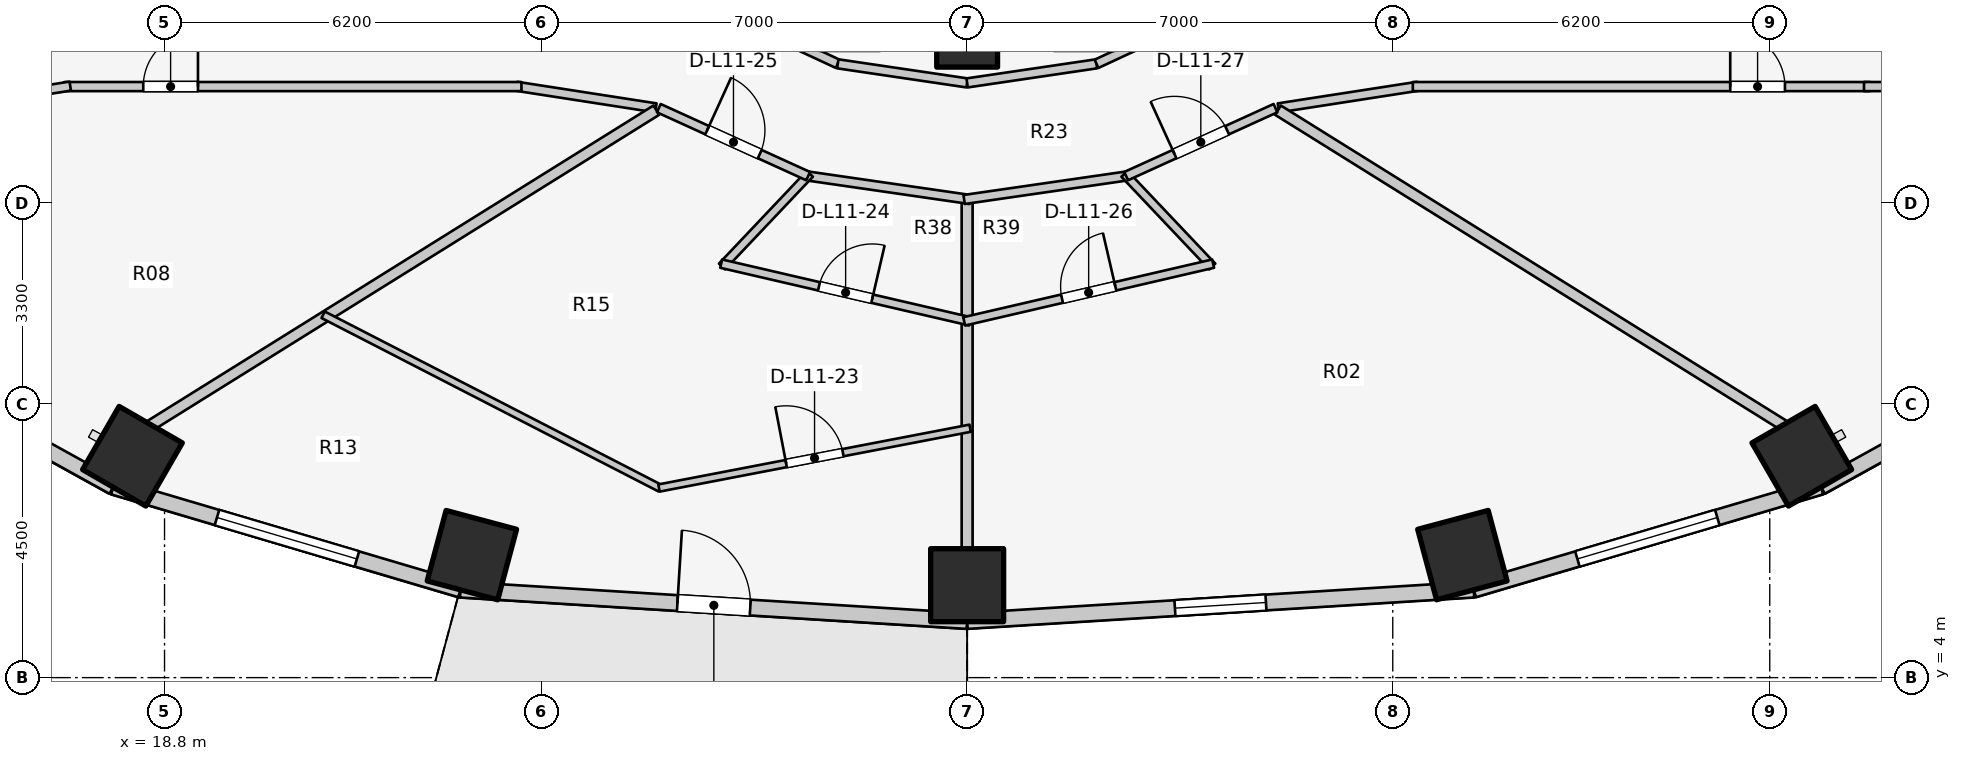
"""IFC4 building model, lengths in metres.
Left out: names, types, materials, properties, quantities, classifications, styles, units other than length and angle.
Written with IfcOpenShell. Run it as: python <this file> out.ifc"""

import sys

from ifc_helpers import new_model, si_unit, direction, frame, frame_2d, origin, origin_2d, place, context, subcontext, project, spatial, rectangle, extrude, element, fill, save


model = new_model("IFC4")
c1 = context("Model", 3, precision=1e-05, world=origin(), true_north=direction((0.0, 1.0)))
c2 = subcontext(c1, "Body", "Model", "MODEL_VIEW")
j1 = project(units=[si_unit("LENGTHUNIT", "METRE"), si_unit("PLANEANGLEUNIT", "RADIAN")], contexts=[c1])
p1 = place(None, origin())
s1 = spatial("IfcSite", under=j1, at=p1, CompositionType="ELEMENT")
p2 = place(p1, origin())
s2 = spatial("IfcBuilding", under=s1, at=p2, CompositionType="ELEMENT")
p3 = place(p2, frame((0.0, 0.0, 40.0)))
s3 = spatial("IfcBuildingStorey", under=s2, at=p3, CompositionType="ELEMENT", Elevation=40.0)
for number, where, z_axis, x_axis in (
    (1, (18.273, 7.641, 0.0), (0.0, 0.0, 1.0), (-0.5, -0.866, 0.0)),
    (2, (23.855, 6.014, 0.0), (0.0, 0.0, 1.0), (-0.259, -0.966, 0.0)),
):
    element("IfcColumn", number, at=place(p3, frame(where, z_axis=z_axis, x_axis=x_axis)), inside=s3, PredefinedType="COLUMN", context=c2, shape_type="SweptSolid", body=[
        extrude(rectangle(XDim=1.2, YDim=1.2, at=origin_2d()), origin(), (0.0, 0.0, 1.0), 3.1),
    ])
p4 = place(p3, frame((32.0, 14.54, 0.0), z_axis=(0.0, 0.0, 1.0), x_axis=(1.0, 0.0, 0.0)))
e3 = element("IfcColumn", 3, at=p4, inside=s3, PredefinedType="COLUMN", context=c2, shape_type="SweptSolid", body=[
    extrude(rectangle(XDim=1.0, YDim=1.0, at=origin_2d()), origin(), (0.0, 0.0, 1.0), 3.1),
])
for number, where, z_axis, x_axis in (
    (4, (32.0, 5.52, 0.0), (0.0, 0.0, 1.0), (0.0, -1.0, 0.0)),
    (5, (40.145, 6.014, 0.0), (0.0, 0.0, 1.0), (0.259, -0.966, 0.0)),
    (6, (45.727, 7.641, 0.0), (0.0, 0.0, 1.0), (0.5, -0.866, 0.0)),
):
    element("IfcColumn", number, at=place(p3, frame(where, z_axis=z_axis, x_axis=x_axis)), inside=s3, PredefinedType="COLUMN", context=c2, shape_type="SweptSolid", body=[
        extrude(rectangle(XDim=1.2, YDim=1.2, at=origin_2d()), origin(), (0.0, 0.0, 1.0), 3.1),
    ])
p5 = place(p3, frame((13.595, 9.55, 0.0), z_axis=(0.0, 0.0, 1.0), x_axis=(0.875137303239, -0.483874674352, 0.0)))
e7 = element("IfcWall", 7, at=p5, inside=s3, PredefinedType="STANDARD", context=c2, shape_type="SweptSolid", body=[
    extrude(rectangle(XDim=4.985, YDim=0.26, at=frame_2d((2.493, 0.0))), origin(), (0.0, 0.0, 1.0), 2.85),
])
p6 = place(p3, frame((17.958, 7.138, 0.0), z_axis=(0.0, 0.0, 1.0), x_axis=(0.958843593522, -0.283934786811, 0.0)))
e8 = element("IfcWall", 8, at=p6, inside=s3, PredefinedType="STANDARD", context=c2, shape_type="SweptSolid", body=[
    extrude(rectangle(XDim=5.955, YDim=0.26, at=frame_2d((2.978, 0.0))), origin(), (0.0, 0.0, 1.0), 2.85),
])
p7 = place(p6, frame((1.778, 0.0, 0.75)))
e9 = element("IfcOpeningElement", 9, at=p7, cuts=e8, PredefinedType="OPENING", context=c2, shape_type="SweptSolid", body=[
    extrude(rectangle(XDim=2.4, YDim=1.7, at=frame_2d((1.2, 0.85))), frame((0.0, 0.14, 0.0), z_axis=(0.0, -1.0, 0.0), x_axis=(1.0, 0.0, 0.0)), (0.0, 0.0, 1.0), 0.28),
])
p8 = place(p3, frame((23.668, 5.447, 0.0), z_axis=(0.0, 0.0, 1.0), x_axis=(0.998090514779, -0.061768311519, 0.0)))
e10 = element("IfcWall", 10, at=p8, inside=s3, PredefinedType="STANDARD", context=c2, shape_type="SweptSolid", body=[
    extrude(rectangle(XDim=8.348, YDim=0.26, at=frame_2d((4.174, 0.0))), origin(), (0.0, 0.0, 1.0), 2.88),
])
p9 = place(p8, frame((3.574, 0.0, 0.0)))
e11 = element("IfcOpeningElement", 11, at=p9, cuts=e10, PredefinedType="OPENING", context=c2, shape_type="SweptSolid", body=[
    extrude(rectangle(XDim=1.2, YDim=2.2, at=frame_2d((0.6, 1.1))), frame((0.0, 0.14, 0.0), z_axis=(0.0, -1.0, 0.0), x_axis=(1.0, 0.0, 0.0)), (0.0, 0.0, 1.0), 0.28),
])
p10 = place(p3, frame((32.0, 4.931, 0.0), z_axis=(0.0, 0.0, 1.0), x_axis=(0.998090514779, 0.061768311519, 0.0)))
e12 = element("IfcWall", 12, at=p10, inside=s3, PredefinedType="STANDARD", context=c2, shape_type="SweptSolid", body=[
    extrude(rectangle(XDim=8.348, YDim=0.26, at=frame_2d((4.174, 0.0))), origin(), (0.0, 0.0, 1.0), 2.85),
])
p11 = place(p10, frame((3.424, 0.0, 0.75)))
e13 = element("IfcOpeningElement", 13, at=p11, cuts=e12, PredefinedType="OPENING", context=c2, shape_type="SweptSolid", body=[
    extrude(rectangle(XDim=1.5, YDim=1.6, at=frame_2d((0.75, 0.8))), frame((0.0, 0.14, 0.0), z_axis=(0.0, -1.0, 0.0), x_axis=(1.0, 0.0, 0.0)), (0.0, 0.0, 1.0), 0.28),
])
p12 = place(p3, frame((40.332, 5.447, 0.0), z_axis=(0.0, 0.0, 1.0), x_axis=(0.958843593522, 0.283934786811, 0.0)))
e14 = element("IfcWall", 14, at=p12, inside=s3, PredefinedType="STANDARD", context=c2, shape_type="SweptSolid", body=[
    extrude(rectangle(XDim=5.955, YDim=0.26, at=frame_2d((2.978, 0.0))), origin(), (0.0, 0.0, 1.0), 2.85),
])
p13 = place(p12, frame((1.778, 0.0, 0.75)))
e15 = element("IfcOpeningElement", 15, at=p13, cuts=e14, PredefinedType="OPENING", context=c2, shape_type="SweptSolid", body=[
    extrude(rectangle(XDim=2.4, YDim=1.7, at=frame_2d((1.2, 0.85))), frame((0.0, 0.14, 0.0), z_axis=(0.0, -1.0, 0.0), x_axis=(1.0, 0.0, 0.0)), (0.0, 0.0, 1.0), 0.28),
])
p14 = place(p3, frame((46.042, 7.138, 0.0), z_axis=(0.0, 0.0, 1.0), x_axis=(0.875137303239, 0.483874674352, 0.0)))
e16 = element("IfcWall", 16, at=p14, inside=s3, PredefinedType="STANDARD", context=c2, shape_type="SweptSolid", body=[
    extrude(rectangle(XDim=4.985, YDim=0.26, at=frame_2d((2.493, 0.0))), origin(), (0.0, 0.0, 1.0), 2.85),
])
p15 = place(p3, frame((27.89, 15.015, 0.0), z_axis=(0.0, 0.0, 1.0), x_axis=(0.906943449489, -0.421252393975, 0.0)))
e17 = element("IfcWall", 17, at=p15, inside=s3, PredefinedType="PARTITIONING", context=c2, shape_type="SweptSolid", body=[
    extrude(rectangle(XDim=2.186, YDim=0.15, at=frame_2d((1.093, 0.0))), origin(), (0.0, 0.0, 1.0), 2.237),
])
for number, where, z_axis, x_axis in (
    (18, (29.873, 14.094, 0.0), (0.0, 0.0, 1.0), (0.989, -0.146, 0.0)),
    (19, (32.0, 13.78, 0.0), (0.0, 0.0, 1.0), (0.989, 0.146, 0.0)),
):
    element("IfcWall", number, at=place(p3, frame(where, z_axis=z_axis, x_axis=x_axis)), inside=s3, PredefinedType="PARTITIONING", context=c2, shape_type="SweptSolid", body=[
        extrude(rectangle(XDim=2.151, YDim=0.15, at=frame_2d((1.075, 0.0))), origin(), (0.0, 0.0, 1.0), 2.237),
    ])
p16 = place(p3, frame((34.127, 14.094, 0.0), z_axis=(0.0, 0.0, 1.0), x_axis=(0.906943449489, 0.421252393975, 0.0)))
e20 = element("IfcWall", 20, at=p16, inside=s3, PredefinedType="PARTITIONING", context=c2, shape_type="SweptSolid", body=[
    extrude(rectangle(XDim=2.186, YDim=0.15, at=frame_2d((1.093, 0.0))), origin(), (0.0, 0.0, 1.0), 2.237),
])
p17 = place(p3, frame((26.881, 13.369, 0.0), z_axis=(0.0, 0.0, 1.0), x_axis=(-0.988184633586, 0.153268163508, 0.0)))
e21 = element("IfcWall", 21, at=p17, inside=s3, PredefinedType="PARTITIONING", context=c2, shape_type="SweptSolid", body=[
    extrude(rectangle(XDim=2.318, YDim=0.15, at=frame_2d((1.159, 0.0))), origin(), (0.0, 0.0, 1.0), 2.237),
])
p18 = place(p3, frame((17.15, 13.72, 0.0), z_axis=(0.0, 0.0, 1.0), x_axis=(1.0, 0.0, 0.0)))
e22 = element("IfcWall", 22, at=p18, inside=s3, PredefinedType="PARTITIONING", context=c2, shape_type="SweptSolid", body=[
    extrude(rectangle(XDim=7.52, YDim=0.15, at=frame_2d((3.76, 0.0))), origin(), (0.0, 0.0, 1.0), 2.237),
])
p19 = place(p18, frame((1.3, 0.0, 0.0)))
e23 = element("IfcOpeningElement", 23, at=p19, cuts=e22, PredefinedType="OPENING", context=c2, shape_type="SweptSolid", body=[
    extrude(rectangle(XDim=0.9, YDim=2.1, at=frame_2d((0.45, 1.05))), frame((0.0, 0.085, 0.0), z_axis=(0.0, -1.0, 0.0), x_axis=(1.0, 0.0, 0.0)), (0.0, 0.0, 1.0), 0.17),
])
p20 = place(p3, frame((17.25, 13.728, 0.0), z_axis=(0.0, 0.0, 1.0), x_axis=(-0.987655781226, -0.156639898525, 0.0)))
e24 = element("IfcWall", 24, at=p20, inside=s3, PredefinedType="PARTITIONING", context=c2, shape_type="SweptSolid", body=[
    extrude(rectangle(XDim=7.552, YDim=0.15, at=frame_2d((3.776, 0.0))), origin(), (0.0, 0.0, 1.0), 2.069),
])
p21 = place(p3, frame((37.119, 13.369, 0.0), z_axis=(0.0, 0.0, 1.0), x_axis=(0.988184633586, 0.153268163508, 0.0)))
e25 = element("IfcWall", 25, at=p21, inside=s3, PredefinedType="PARTITIONING", context=c2, shape_type="SweptSolid", body=[
    extrude(rectangle(XDim=2.318, YDim=0.15, at=frame_2d((1.159, 0.0))), origin(), (0.0, 0.0, 1.0), 2.237),
])
p22 = place(p3, frame((39.33, 13.72, 0.0), z_axis=(0.0, 0.0, 1.0), x_axis=(1.0, 0.0, 0.0)))
e26 = element("IfcWall", 26, at=p22, inside=s3, PredefinedType="PARTITIONING", context=c2, shape_type="SweptSolid", body=[
    extrude(rectangle(XDim=7.52, YDim=0.15, at=frame_2d((3.76, 0.0))), origin(), (0.0, 0.0, 1.0), 2.237),
])
p23 = place(p22, frame((5.22, 0.0, 0.0)))
e27 = element("IfcOpeningElement", 27, at=p23, cuts=e26, PredefinedType="OPENING", context=c2, shape_type="SweptSolid", body=[
    extrude(rectangle(XDim=0.9, YDim=2.1, at=frame_2d((0.45, 1.05))), frame((0.0, 0.085, 0.0), z_axis=(0.0, -1.0, 0.0), x_axis=(1.0, 0.0, 0.0)), (0.0, 0.0, 1.0), 0.17),
])
p24 = place(p3, frame((46.75, 13.72, 0.0), z_axis=(0.0, 0.0, 1.0), x_axis=(1.0, 0.0, 0.0)))
e28 = element("IfcWall", 28, at=p24, inside=s3, PredefinedType="PARTITIONING", context=c2, shape_type="SweptSolid", body=[
    extrude(rectangle(XDim=5.05, YDim=0.15, at=frame_2d((2.525, 0.0))), origin(), (0.0, 0.0, 1.0), 2.069),
])
p25 = place(p3, frame((26.888, 13.332, 0.0), z_axis=(0.0, 0.0, 1.0), x_axis=(-0.848647785721, -0.52895834977, 0.0)))
e29 = element("IfcWall", 29, at=p25, inside=s3, PredefinedType="PARTITIONING", context=c2, shape_type="SweptSolid", body=[
    extrude(rectangle(XDim=9.81, YDim=0.18, at=frame_2d((4.905, 0.0))), origin(), (0.0, 0.0, 1.0), 2.237),
])
p26 = place(p3, frame((32.0, 11.815, 0.0), z_axis=(0.0, 0.0, 1.0), x_axis=(0.0, -1.0, 0.0)))
e30 = element("IfcWall", 30, at=p26, inside=s3, PredefinedType="PARTITIONING", context=c2, shape_type="SweptSolid", body=[
    extrude(rectangle(XDim=5.715, YDim=0.18, at=frame_2d((2.857, 0.0))), origin(), (0.0, 0.0, 1.0), 2.237),
])
p27 = place(p3, frame((37.112, 13.332, 0.0), z_axis=(0.0, 0.0, 1.0), x_axis=(0.848647785721, -0.52895834977, 0.0)))
e31 = element("IfcWall", 31, at=p27, inside=s3, PredefinedType="PARTITIONING", context=c2, shape_type="SweptSolid", body=[
    extrude(rectangle(XDim=9.81, YDim=0.18, at=frame_2d((4.905, 0.0))), origin(), (0.0, 0.0, 1.0), 2.237),
])
p28 = place(p3, frame((21.409, 9.967, 0.0), z_axis=(0.0, 0.0, 1.0), x_axis=(0.889172609005, -0.457571930296, 0.0)))
e32 = element("IfcWall", 32, at=p28, inside=s3, PredefinedType="MOVABLE", context=c2, shape_type="SweptSolid", body=[
    extrude(rectangle(XDim=6.232, YDim=0.12, at=frame_2d((3.116, 0.0))), origin(), (0.0, 0.0, 1.0), 2.237),
])
p29 = place(p3, frame((26.932, 7.118, 0.0), z_axis=(0.0, 0.0, 1.0), x_axis=(0.982039182538, 0.188677089126, 0.0)))
e33 = element("IfcWall", 33, at=p29, inside=s3, PredefinedType="MOVABLE", context=c2, shape_type="SweptSolid", body=[
    extrude(rectangle(XDim=5.211, YDim=0.12, at=frame_2d((2.605, 0.0))), origin(), (0.0, 0.0, 1.0), 2.237),
])
p30 = place(p29, frame((2.131, 0.0, 0.0)))
e34 = element("IfcOpeningElement", 34, at=p30, cuts=e33, PredefinedType="OPENING", context=c2, shape_type="SweptSolid", body=[
    extrude(rectangle(XDim=0.95, YDim=2.1, at=frame_2d((0.475, 1.05))), frame((0.0, 0.07, 0.0), z_axis=(0.0, -1.0, 0.0), x_axis=(1.0, 0.0, 0.0)), (0.0, 0.0, 1.0), 0.14),
])
p31 = place(p3, frame((29.329, 12.256, 0.0), z_axis=(0.0, 0.0, 1.0), x_axis=(0.989701115085, -0.143149232617, 0.0)))
e35 = element("IfcWall", 35, at=p31, inside=s3, PredefinedType="PARTITIONING", context=c2, shape_type="SweptSolid", body=[
    extrude(rectangle(XDim=2.749, YDim=0.15, at=frame_2d((1.375, 0.0))), origin(), (0.0, 0.0, 1.0), 2.237),
])
p32 = place(p3, frame((29.413, 12.285, 0.0), z_axis=(0.0, 0.0, 1.0), x_axis=(-0.687544693502, -0.72614206216, 0.0)))
e36 = element("IfcWall", 36, at=p32, inside=s3, PredefinedType="PLUMBINGWALL", context=c2, shape_type="SweptSolid", body=[
    extrude(rectangle(XDim=2.1, YDim=0.14, at=frame_2d((1.05, 0.0))), origin(), (0.0, 0.0, 1.0), 2.855),
])
p33 = place(p3, frame((27.954, 10.808, 0.0), z_axis=(0.0, 0.0, 1.0), x_axis=(0.974148813221, -0.225907259071, 0.0)))
e37 = element("IfcWall", 37, at=p33, inside=s3, PredefinedType="PLUMBINGWALL", context=c2, shape_type="SweptSolid", body=[
    extrude(rectangle(XDim=4.203, YDim=0.14, at=frame_2d((2.102, 0.0))), origin(), (0.0, 0.0, 1.0), 2.237),
])
p34 = place(p33, frame((1.652, 0.0, 0.0)))
e38 = element("IfcOpeningElement", 38, at=p34, cuts=e37, PredefinedType="OPENING", context=c2, shape_type="SweptSolid", body=[
    extrude(rectangle(XDim=0.9, YDim=2.1, at=frame_2d((0.45, 1.05))), frame((0.0, 0.08, 0.0), z_axis=(0.0, -1.0, 0.0), x_axis=(1.0, 0.0, 0.0)), (0.0, 0.0, 1.0), 0.16),
])
p35 = place(p3, frame((26.929, 13.365, 0.0), z_axis=(0.0, 0.0, 1.0), x_axis=(0.910186679378, -0.414198272186, 0.0)))
e39 = element("IfcWall", 39, at=p35, inside=s3, PredefinedType="PARTITIONING", context=c2, shape_type="SweptSolid", body=[
    extrude(rectangle(XDim=2.698, YDim=0.15, at=frame_2d((1.349, 0.0))), origin(), (0.0, 0.0, 1.0), 2.237),
])
p36 = place(p35, frame((0.874, 0.0, 0.0)))
e40 = element("IfcOpeningElement", 40, at=p36, cuts=e39, PredefinedType="OPENING", context=c2, shape_type="SweptSolid", body=[
    extrude(rectangle(XDim=0.95, YDim=2.1, at=frame_2d((0.475, 1.05))), frame((0.0, 0.085, 0.0), z_axis=(0.0, -1.0, 0.0), x_axis=(1.0, 0.0, 0.0)), (0.0, 0.0, 1.0), 0.17),
])
p37 = place(p3, frame((31.95, 11.863, 0.0), z_axis=(0.0, 0.0, 1.0), x_axis=(0.989701115085, 0.143149232617, 0.0)))
e41 = element("IfcWall", 41, at=p37, inside=s3, PredefinedType="PARTITIONING", context=c2, shape_type="SweptSolid", body=[
    extrude(rectangle(XDim=2.749, YDim=0.15, at=frame_2d((1.375, 0.0))), origin(), (0.0, 0.0, 1.0), 2.237),
])
p38 = place(p3, frame((34.587, 12.285, 0.0), z_axis=(0.0, 0.0, 1.0), x_axis=(0.687544693502, -0.72614206216, 0.0)))
e42 = element("IfcWall", 42, at=p38, inside=s3, PredefinedType="PLUMBINGWALL", context=c2, shape_type="SweptSolid", body=[
    extrude(rectangle(XDim=2.1, YDim=0.14, at=frame_2d((1.05, 0.0))), origin(), (0.0, 0.0, 1.0), 2.855),
])
p39 = place(p3, frame((31.951, 9.859, 0.0), z_axis=(0.0, 0.0, 1.0), x_axis=(0.974148813221, 0.225907259071, 0.0)))
e43 = element("IfcWall", 43, at=p39, inside=s3, PredefinedType="PLUMBINGWALL", context=c2, shape_type="SweptSolid", body=[
    extrude(rectangle(XDim=4.203, YDim=0.14, at=frame_2d((2.102, 0.0))), origin(), (0.0, 0.0, 1.0), 2.237),
])
p40 = place(p39, frame((1.652, 0.0, 0.0)))
e44 = element("IfcOpeningElement", 44, at=p40, cuts=e43, PredefinedType="OPENING", context=c2, shape_type="SweptSolid", body=[
    extrude(rectangle(XDim=0.9, YDim=2.1, at=frame_2d((0.45, 1.05))), frame((0.0, 0.08, 0.0), z_axis=(0.0, -1.0, 0.0), x_axis=(1.0, 0.0, 0.0)), (0.0, 0.0, 1.0), 0.16),
])
p41 = place(p3, frame((34.615, 12.247, 0.0), z_axis=(0.0, 0.0, 1.0), x_axis=(0.910186679378, 0.414198272186, 0.0)))
e45 = element("IfcWall", 45, at=p41, inside=s3, PredefinedType="PARTITIONING", context=c2, shape_type="SweptSolid", body=[
    extrude(rectangle(XDim=2.698, YDim=0.15, at=frame_2d((1.349, 0.0))), origin(), (0.0, 0.0, 1.0), 2.237),
])
p42 = place(p41, frame((0.874, 0.0, 0.0)))
e46 = element("IfcOpeningElement", 46, at=p42, cuts=e45, PredefinedType="OPENING", context=c2, shape_type="SweptSolid", body=[
    extrude(rectangle(XDim=0.95, YDim=2.1, at=frame_2d((0.475, 1.05))), frame((0.0, 0.085, 0.0), z_axis=(0.0, -1.0, 0.0), x_axis=(1.0, 0.0, 0.0)), (0.0, 0.0, 1.0), 0.17),
])
p43 = place(p7, origin())
e47 = element("IfcWindow", 47, at=p43, inside=s3, PartitioningType="SINGLE_PANEL", PredefinedType="WINDOW", context=c2, shape_type="SweptSolid", body=[
    extrude(rectangle(XDim=2.4, YDim=1.7, at=frame_2d((1.2, 0.85))), frame((0.0, 0.03, 0.0), z_axis=(0.0, -1.0, 0.0), x_axis=(1.0, 0.0, 0.0)), (0.0, 0.0, 1.0), 0.06),
])
fill(e9, e47)
p44 = place(p9, origin())
e48 = element("IfcDoor", 48, at=p44, inside=s3, OperationType="SINGLE_SWING_LEFT", PredefinedType="DOOR", context=c2, shape_type="SweptSolid", body=[
    extrude(rectangle(XDim=1.2, YDim=2.2, at=frame_2d((0.6, 1.1))), frame((0.0, 0.025, 0.0), z_axis=(0.0, -1.0, 0.0), x_axis=(1.0, 0.0, 0.0)), (0.0, 0.0, 1.0), 0.05),
])
fill(e11, e48)
p45 = place(p11, origin())
e49 = element("IfcWindow", 49, at=p45, inside=s3, PartitioningType="SINGLE_PANEL", PredefinedType="WINDOW", context=c2, shape_type="SweptSolid", body=[
    extrude(rectangle(XDim=1.5, YDim=1.6, at=frame_2d((0.75, 0.8))), frame((0.0, 0.03, 0.0), z_axis=(0.0, -1.0, 0.0), x_axis=(1.0, 0.0, 0.0)), (0.0, 0.0, 1.0), 0.06),
])
fill(e13, e49)
p46 = place(p13, origin())
e50 = element("IfcWindow", 50, at=p46, inside=s3, PartitioningType="SINGLE_PANEL", PredefinedType="WINDOW", context=c2, shape_type="SweptSolid", body=[
    extrude(rectangle(XDim=2.4, YDim=1.7, at=frame_2d((1.2, 0.85))), frame((0.0, 0.03, 0.0), z_axis=(0.0, -1.0, 0.0), x_axis=(1.0, 0.0, 0.0)), (0.0, 0.0, 1.0), 0.06),
])
fill(e15, e50)
p47 = place(p19, origin())
e51 = element("IfcDoor", 51, at=p47, inside=s3, OperationType="SINGLE_SWING_RIGHT", PredefinedType="DOOR", context=c2, shape_type="SweptSolid", body=[
    extrude(rectangle(XDim=0.9, YDim=2.1, at=frame_2d((0.45, 1.05))), frame((0.0, 0.025, 0.0), z_axis=(0.0, -1.0, 0.0), x_axis=(1.0, 0.0, 0.0)), (0.0, 0.0, 1.0), 0.05),
])
fill(e23, e51)
p48 = place(p23, origin())
e52 = element("IfcDoor", 52, at=p48, inside=s3, OperationType="SINGLE_SWING_LEFT", PredefinedType="DOOR", context=c2, shape_type="SweptSolid", body=[
    extrude(rectangle(XDim=0.9, YDim=2.1, at=frame_2d((0.45, 1.05))), frame((0.0, 0.025, 0.0), z_axis=(0.0, -1.0, 0.0), x_axis=(1.0, 0.0, 0.0)), (0.0, 0.0, 1.0), 0.05),
])
fill(e27, e52)
p49 = place(p30, origin())
e53 = element("IfcDoor", 53, at=p49, inside=s3, OperationType="SINGLE_SWING_LEFT", PredefinedType="DOOR", context=c2, shape_type="SweptSolid", body=[
    extrude(rectangle(XDim=0.95, YDim=2.1, at=frame_2d((0.475, 1.05))), frame((0.0, 0.025, 0.0), z_axis=(0.0, -1.0, 0.0), x_axis=(1.0, 0.0, 0.0)), (0.0, 0.0, 1.0), 0.05),
])
fill(e34, e53)
p50 = place(p34, origin())
e54 = element("IfcDoor", 54, at=p50, inside=s3, OperationType="SINGLE_SWING_RIGHT", PredefinedType="DOOR", context=c2, shape_type="SweptSolid", body=[
    extrude(rectangle(XDim=0.9, YDim=2.1, at=frame_2d((0.45, 1.05))), frame((0.0, 0.025, 0.0), z_axis=(0.0, -1.0, 0.0), x_axis=(1.0, 0.0, 0.0)), (0.0, 0.0, 1.0), 0.05),
])
fill(e38, e54)
p51 = place(p36, origin())
e55 = element("IfcDoor", 55, at=p51, inside=s3, OperationType="SINGLE_SWING_LEFT", PredefinedType="DOOR", context=c2, shape_type="SweptSolid", body=[
    extrude(rectangle(XDim=0.95, YDim=2.1, at=frame_2d((0.475, 1.05))), frame((0.0, 0.025, 0.0), z_axis=(0.0, -1.0, 0.0), x_axis=(1.0, 0.0, 0.0)), (0.0, 0.0, 1.0), 0.05),
])
fill(e40, e55)
p52 = place(p40, origin())
e56 = element("IfcDoor", 56, at=p52, inside=s3, OperationType="SINGLE_SWING_RIGHT", PredefinedType="DOOR", context=c2, shape_type="SweptSolid", body=[
    extrude(rectangle(XDim=0.9, YDim=2.1, at=frame_2d((0.45, 1.05))), frame((0.0, 0.025, 0.0), z_axis=(0.0, -1.0, 0.0), x_axis=(1.0, 0.0, 0.0)), (0.0, 0.0, 1.0), 0.05),
])
fill(e44, e56)
p53 = place(p42, origin())
e57 = element("IfcDoor", 57, at=p53, inside=s3, OperationType="SINGLE_SWING_LEFT", PredefinedType="DOOR", context=c2, shape_type="SweptSolid", body=[
    extrude(rectangle(XDim=0.95, YDim=2.1, at=frame_2d((0.475, 1.05))), frame((0.0, 0.025, 0.0), z_axis=(0.0, -1.0, 0.0), x_axis=(1.0, 0.0, 0.0)), (0.0, 0.0, 1.0), 0.05),
])
fill(e46, e57)
save(model, sys.argv[1])
